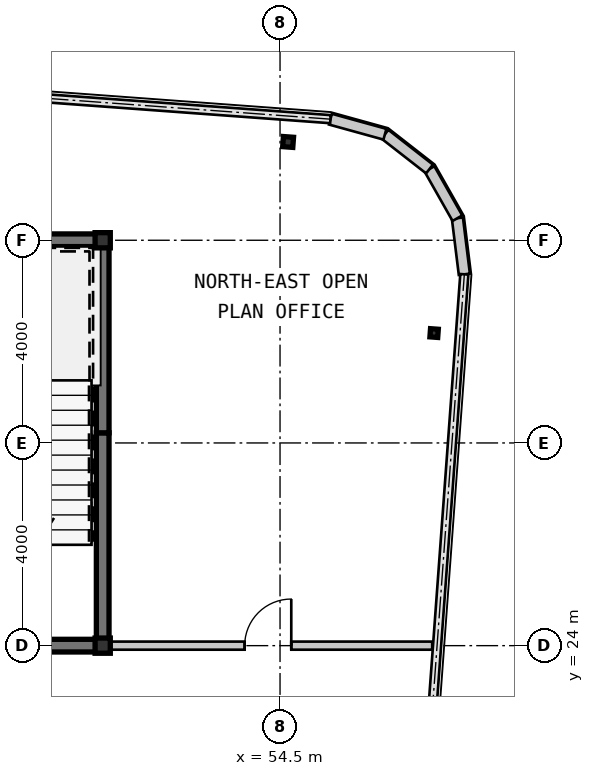
"""IFC4 building model, lengths in metres.
Left out: names, types, materials, properties, quantities, classifications, styles, units other than length and angle.
Written with IfcOpenShell. Run it as: python <this file> out.ifc"""

import sys

from ifc_helpers import new_model, si_unit, direction, frame, frame_2d, origin, origin_2d, place, context, subcontext, project, spatial, rectangle, hollow_rectangle, i_section, extrude, source, transform, mapped, element, fill, save


model = new_model("IFC4")
c1 = context("Model", 3, precision=1e-05, world=origin(), true_north=direction((0.0, 1.0)))
c2 = subcontext(c1, "Body", "Model", "MODEL_VIEW")
j1 = project(units=[si_unit("LENGTHUNIT", "METRE"), si_unit("PLANEANGLEUNIT", "RADIAN")], contexts=[c1])
p1 = place(None, origin())
s1 = spatial("IfcSite", under=j1, at=p1, CompositionType="ELEMENT")
p2 = place(p1, origin())
s2 = spatial("IfcBuilding", under=s1, at=p2, CompositionType="ELEMENT")
p3 = place(p2, frame((0.0, 0.0, 239.75)))
s3 = spatial("IfcBuildingStorey", under=s2, at=p3, CompositionType="ELEMENT", Elevation=239.75)
m1 = source(origin(), c2, "Body", "SweptSolid", [
    extrude(hollow_rectangle(XDim=0.3, YDim=0.3, WallThickness=0.012, at=origin_2d()), origin(), (0.0, 0.0, 1.0), 3.15),
])
for number, where, z_axis, x_axis in (
    (1, (51.0, 24.0, 0.0), (0.0, 0.0, 1.0), (1.0, 0.0, 0.0)),
    (2, (51.0, 32.0, 0.0), (0.0, 0.0, 1.0), (1.0, 0.0, 0.0)),
):
    element("IfcColumn", number, at=place(p3, frame(where, z_axis=z_axis, x_axis=x_axis)), inside=s3, PredefinedType="COLUMN", context=c2, shape_type="MappedRepresentation", body=[
        mapped(m1, transform((0.0, 0.0, 0.0), scale=1.0)),
    ])
m2 = source(origin(), c2, "Body", "SweptSolid", [
    extrude(hollow_rectangle(XDim=0.2, YDim=0.2, WallThickness=0.009, at=origin_2d()), origin(), (0.0, 0.0, 1.0), 3.15),
])
p4 = place(p3, frame((54.659, 33.94, 0.0), z_axis=(0.0, 0.0, 1.0), x_axis=(0.997314477224, -0.073238197128, 0.0)))
e3 = element("IfcColumn", 3, at=p4, inside=s3, PredefinedType="COLUMN", context=c2, shape_type="MappedRepresentation", body=[
    mapped(m2, transform((0.0, 0.0, 0.0), scale=1.0)),
])
m3 = source(origin(), c2, "Body", "SweptSolid", [
    extrude(i_section(OverallWidth=0.154, OverallDepth=0.162, WebThickness=0.008, FlangeThickness=0.011, at=origin_2d()), origin(), (0.0, 0.0, 1.0), 3.15),
])
p5 = place(p3, frame((57.541, 30.169, 0.0), z_axis=(0.0, 0.0, 1.0), x_axis=(0.997314477224, -0.073238197128, 0.0)))
e4 = element("IfcColumn", 4, at=p5, inside=s3, PredefinedType="COLUMN", context=c2, shape_type="MappedRepresentation", body=[
    mapped(m3, transform((0.0, 0.0, 0.0), scale=1.0)),
])
m4 = source(origin(), c2, "Body", "SweptSolid", [
    extrude(rectangle(XDim=1.116, YDim=0.22, at=frame_2d((0.558, 0.0))), origin(), (0.0, 0.0, 1.0), 2.93),
])
p6 = place(p3, frame((58.137, 31.328, 0.0), z_axis=(0.0, 0.0, 1.0), x_axis=(-0.122742076028, 0.992438604032, 0.0)))
e5 = element("IfcWall", 5, at=p6, inside=s3, PredefinedType="SOLIDWALL", context=c2, shape_type="MappedRepresentation", body=[
    mapped(m4, transform((0.0, 0.0, 0.0), scale=1.0)),
])
m5 = source(origin(), c2, "Body", "SweptSolid", [
    extrude(rectangle(XDim=1.116, YDim=0.22, at=frame_2d((0.558, 0.0))), origin(), (0.0, 0.0, 1.0), 2.93),
])
p7 = place(p3, frame((58.0, 32.436, 0.0), z_axis=(0.0, 0.0, 1.0), x_axis=(-0.493167138628, 0.869934579941, 0.0)))
e6 = element("IfcWall", 6, at=p7, inside=s3, PredefinedType="SOLIDWALL", context=c2, shape_type="MappedRepresentation", body=[
    mapped(m5, transform((0.0, 0.0, 0.0), scale=1.0)),
])
p8 = place(p3, frame((57.45, 33.406, 0.0), z_axis=(0.0, 0.0, 1.0), x_axis=(-0.788597772321, 0.614909386406, 0.0)))
e7 = element("IfcWall", 7, at=p8, inside=s3, PredefinedType="SOLIDWALL", context=c2, shape_type="MappedRepresentation", body=[
    mapped(m4, transform((0.0, 0.0, 0.0), scale=1.0)),
])
p9 = place(p3, frame((56.57, 34.093, 0.0), z_axis=(0.0, 0.0, 1.0), x_axis=(-0.963833843713, 0.266503886865, 0.0)))
e8 = element("IfcWall", 8, at=p9, inside=s3, PredefinedType="SOLIDWALL", context=c2, shape_type="MappedRepresentation", body=[
    mapped(m5, transform((0.0, 0.0, 0.0), scale=1.0)),
])
m6 = source(origin(), c2, "Body", "SweptSolid", [
    extrude(rectangle(XDim=11.925, YDim=0.25, at=frame_2d((5.962, 0.0))), origin(), (0.0, 0.0, 1.0), 2.93),
])
p10 = place(p3, frame((39.2, 32.0, 0.0), z_axis=(0.0, 0.0, 1.0), x_axis=(1.0, 0.0, 0.0)))
e9 = element("IfcWall", 9, at=p10, inside=s3, PredefinedType="SHEAR", context=c2, shape_type="MappedRepresentation", body=[
    mapped(m6, transform((0.0, 0.0, 0.0), scale=1.0)),
])
m7 = source(origin(), c2, "Body", "SweptSolid", [
    extrude(rectangle(XDim=4.075, YDim=0.25, at=frame_2d((2.038, 0.0))), origin(), (0.0, 0.0, 1.0), 2.93),
])
p11 = place(p3, frame((51.0, 24.125, 0.0), z_axis=(0.0, 0.0, 1.0), x_axis=(0.0, 1.0, 0.0)))
e10 = element("IfcWall", 10, at=p11, inside=s3, PredefinedType="SHEAR", context=c2, shape_type="MappedRepresentation", body=[
    mapped(m7, transform((0.0, 0.0, 0.0), scale=1.0)),
])
m8 = source(origin(), c2, "Body", "SweptSolid", [
    extrude(rectangle(XDim=3.675, YDim=0.25, at=frame_2d((1.837, 0.0))), origin(), (0.0, 0.0, 1.0), 2.93),
])
p12 = place(p3, frame((51.0, 28.2, 0.0), z_axis=(0.0, 0.0, 1.0), x_axis=(0.0, 1.0, 0.0)))
e11 = element("IfcWall", 11, at=p12, inside=s3, PredefinedType="SHEAR", context=c2, shape_type="MappedRepresentation", body=[
    mapped(m8, transform((0.0, 0.0, 0.0), scale=1.0)),
])
m9 = source(origin(), c2, "Body", "SweptSolid", [
    extrude(rectangle(XDim=4.85, YDim=0.25, at=frame_2d((2.425, 0.0))), origin(), (0.0, 0.0, 1.0), 2.93),
])
p13 = place(p3, frame((46.275, 24.0, 0.0), z_axis=(0.0, 0.0, 1.0), x_axis=(1.0, 0.0, 0.0)))
e12 = element("IfcWall", 12, at=p13, inside=s3, PredefinedType="SHEAR", context=c2, shape_type="MappedRepresentation", body=[
    mapped(m9, transform((0.0, 0.0, 0.0), scale=1.0)),
])
m10 = source(origin(), c2, "Body", "SweptSolid", [
    extrude(rectangle(XDim=6.378, YDim=0.16, at=frame_2d((3.189, 0.0))), origin(), (0.0, 0.0, 1.0), 2.93),
])
p14 = place(p3, frame((51.125, 24.0, 0.0), z_axis=(0.0, 0.0, 1.0), x_axis=(1.0, 0.0, 0.0)))
e13 = element("IfcWall", 13, at=p14, inside=s3, PredefinedType="PARTITIONING", context=c2, shape_type="MappedRepresentation", body=[
    mapped(m10, transform((0.0, 0.0, 0.0), scale=1.0)),
])
m11 = source(origin(), c2, "Body", "SweptSolid", [
    extrude(rectangle(XDim=0.92, YDim=2.1, at=frame_2d((0.46, 1.05))), frame((0.0, 0.09, 0.0), z_axis=(0.0, -1.0, 0.0), x_axis=(1.0, 0.0, 0.0)), (0.0, 0.0, 1.0), 0.18),
])
p15 = place(p14, frame((2.677, 0.0, 0.0)))
e14 = element("IfcOpeningElement", 14, at=p15, cuts=e13, PredefinedType="OPENING", context=c2, shape_type="MappedRepresentation", body=[
    mapped(m11, transform((0.0, 0.0, 0.0), scale=1.0)),
])
m12 = source(origin(), c2, "Body", "SweptSolid", [
    extrude(rectangle(XDim=0.92, YDim=2.1, at=frame_2d((0.46, 1.05))), frame((0.0, 0.025, 0.0), z_axis=(0.0, -1.0, 0.0), x_axis=(1.0, 0.0, 0.0)), (0.0, 0.0, 1.0), 0.05),
])
p16 = place(p15, origin())
e15 = element("IfcDoor", 15, at=p16, inside=s3, OperationType="SINGLE_SWING_RIGHT", PredefinedType="DOOR", context=c2, shape_type="MappedRepresentation", body=[
    mapped(m12, transform((0.0, 0.0, 0.0), scale=1.0)),
])
fill(e14, e15)
save(model, sys.argv[1])
